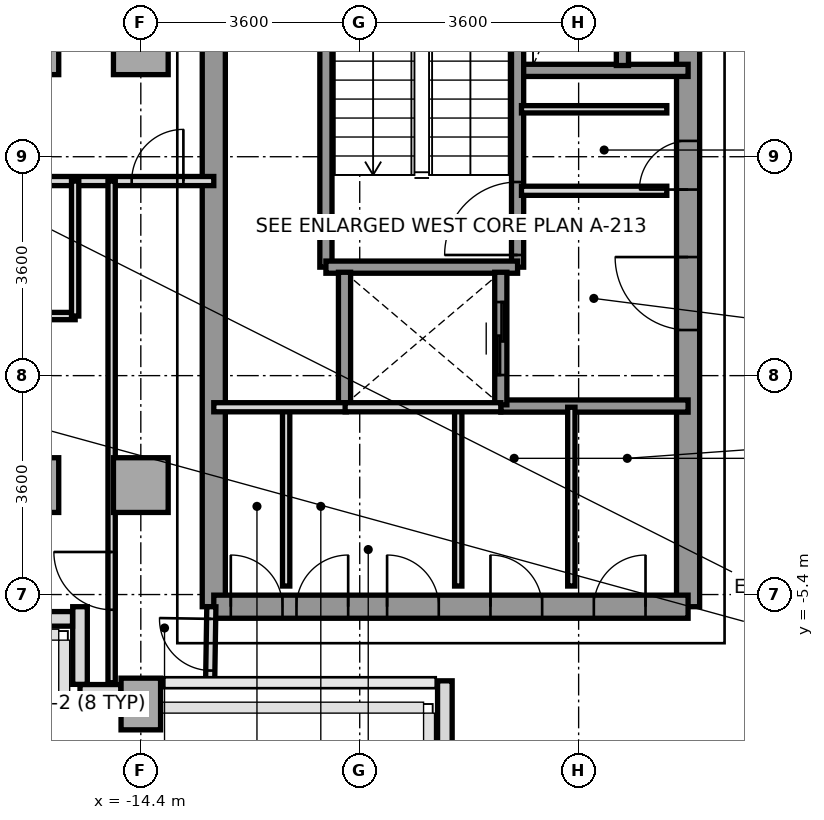
"""IFC4 building model, lengths in metres.
Left out: names, types, materials, properties, quantities, classifications, styles, units other than length and angle.
Written with IfcOpenShell. Run it as: python <this file> out.ifc"""

import sys

from ifc_helpers import new_model, si_unit, direction, frame, frame_2d, origin, origin_2d, place, context, subcontext, project, spatial, rectangle, extrude, source, transform, mapped, element, fill, save


model = new_model("IFC4")
c1 = context("Model", 3, precision=1e-05, world=origin(), true_north=direction((0.0, 1.0)))
c2 = subcontext(c1, "Body", "Model", "MODEL_VIEW")
j1 = project(units=[si_unit("LENGTHUNIT", "METRE"), si_unit("PLANEANGLEUNIT", "RADIAN")], contexts=[c1])
p1 = place(None, origin())
s1 = spatial("IfcSite", under=j1, at=p1, CompositionType="ELEMENT")
p2 = place(p1, origin())
s2 = spatial("IfcBuilding", under=s1, at=p2, CompositionType="ELEMENT")
p3 = place(p2, frame((0.0, 0.0, 184.2)))
s3 = spatial("IfcBuildingStorey", under=s2, at=p3, CompositionType="ELEMENT", Elevation=184.2)
m1 = source(origin(), c2, "Body", "SweptSolid", [
    extrude(rectangle(XDim=0.9, YDim=0.9, at=origin_2d()), origin(), (0.0, 0.0, 1.0), 3.2),
])
for number, where, z_axis, x_axis in (
    (1, (-16.2, -3.6, 0.0), (0.0, 0.0, 1.0), (1.0, 0.0, 0.0)),
    (2, (-16.2, 3.6, 0.0), (0.0, 0.0, 1.0), (1.0, 0.0, 0.0)),
):
    element("IfcColumn", number, at=place(p3, frame(where, z_axis=z_axis, x_axis=x_axis)), inside=s3, PredefinedType="COLUMN", context=c2, shape_type="MappedRepresentation", body=[
        mapped(m1, transform((0.0, 0.0, 0.0), x_axis=(1.0, 0.0, 0.0), y_axis=(0.0, 1.0, 0.0), z_axis=(0.0, 0.0, 1.0), scale=1.0)),
    ])
m2 = source(origin(), c2, "Body", "SweptSolid", [
    extrude(rectangle(XDim=0.65, YDim=0.85, at=origin_2d()), origin(), (0.0, 0.0, 1.0), 3.2),
])
p4 = place(p3, frame((-14.4, -7.2, 0.0), z_axis=(0.0, 0.0, 1.0), x_axis=(1.0, 0.0, 0.0)))
e3 = element("IfcColumn", 3, at=p4, inside=s3, PredefinedType="COLUMN", context=c2, shape_type="MappedRepresentation", body=[
    mapped(m2, transform((0.0, 0.0, 0.0), x_axis=(1.0, 0.0, 0.0), y_axis=(0.0, 1.0, 0.0), z_axis=(0.0, 0.0, 1.0), scale=1.0)),
])
for number, where, z_axis, x_axis in (
    (4, (-14.4, -3.6, 0.0), (0.0, 0.0, 1.0), (1.0, 0.0, 0.0)),
    (5, (-14.4, 3.6, 0.0), (0.0, 0.0, 1.0), (1.0, 0.0, 0.0)),
):
    element("IfcColumn", number, at=place(p3, frame(where, z_axis=z_axis, x_axis=x_axis)), inside=s3, PredefinedType="COLUMN", context=c2, shape_type="MappedRepresentation", body=[
        mapped(m1, transform((0.0, 0.0, 0.0), x_axis=(1.0, 0.0, 0.0), y_axis=(0.0, 1.0, 0.0), z_axis=(0.0, 0.0, 1.0), scale=1.0)),
    ])
p5 = place(p3, frame((-9.4, -8.547, 0.0), z_axis=(0.0, 0.0, 1.0), x_axis=(0.0, 1.0, 0.0)))
e6 = element("IfcWall", 6, at=p5, inside=s3, PredefinedType="PARAPET", context=c2, shape_type="SweptSolid", body=[
    extrude(rectangle(XDim=1.728, YDim=0.24, at=frame_2d((0.864, 0.0))), origin(), (0.0, 0.0, 1.0), 1.15),
])
p6 = place(p3, frame((-14.728, -7.0, 0.0), z_axis=(0.0, 0.0, 1.0), x_axis=(-1.0, 0.0, 0.0)))
e7 = element("IfcWall", 7, at=p6, inside=s3, PredefinedType="PARAPET", context=c2, shape_type="SweptSolid", body=[
    extrude(rectangle(XDim=0.672, YDim=0.24, at=frame_2d((0.336, 0.0))), origin(), (0.0, 0.0, 1.0), 1.15),
])
p7 = place(p3, frame((-15.4, -6.877, 0.0), z_axis=(0.0, 0.0, 1.0), x_axis=(0.0, 1.0, 0.0)))
e8 = element("IfcWall", 8, at=p7, inside=s3, PredefinedType="PARAPET", context=c2, shape_type="SweptSolid", body=[
    extrude(rectangle(XDim=1.277, YDim=0.24, at=frame_2d((0.638, 0.0))), origin(), (0.0, 0.0, 1.0), 1.15),
])
p8 = place(p3, frame((-15.523, -5.8, 0.0), z_axis=(0.0, 0.0, 1.0), x_axis=(-1.0, 0.0, 0.0)))
e9 = element("IfcWall", 9, at=p8, inside=s3, PredefinedType="PARAPET", context=c2, shape_type="SweptSolid", body=[
    extrude(rectangle(XDim=0.614, YDim=0.24, at=frame_2d((0.307, 0.0))), origin(), (0.0, 0.0, 1.0), 1.15),
])
p9 = place(p3, frame((-13.2, -5.6, 0.0), z_axis=(0.0, 0.0, 1.0), x_axis=(0.0, 1.0, 0.0)))
e10 = element("IfcWall", 10, at=p9, inside=s3, PredefinedType="SHEAR", context=c2, shape_type="SweptSolid", body=[
    extrude(rectangle(XDim=11.2, YDim=0.38, at=frame_2d((5.6, 0.0))), origin(), (0.0, 0.0, 1.0), 3.2),
])
p10 = place(p3, frame((-5.4, -5.6, 0.0), z_axis=(0.0, 0.0, 1.0), x_axis=(0.0, 1.0, 0.0)))
e11 = element("IfcWall", 11, at=p10, inside=s3, PredefinedType="SHEAR", context=c2, shape_type="SweptSolid", body=[
    extrude(rectangle(XDim=12.5, YDim=0.38, at=frame_2d((6.25, 0.0))), origin(), (0.0, 0.0, 1.0), 3.2),
])
p11 = place(p10, frame((4.55, 0.0, 0.0)))
e12 = element("IfcOpeningElement", 12, at=p11, cuts=e11, PredefinedType="OPENING", context=c2, shape_type="SweptSolid", body=[
    extrude(rectangle(XDim=1.2, YDim=2.2, at=frame_2d((0.6, 1.1))), frame((0.0, 0.2, 0.0), z_axis=(0.0, -1.0, 0.0), x_axis=(1.0, 0.0, 0.0)), (0.0, 0.0, 1.0), 0.4),
])
p12 = place(p10, frame((10.45, 0.0, 0.0)))
e13 = element("IfcOpeningElement", 13, at=p12, cuts=e11, PredefinedType="OPENING", context=c2, shape_type="SweptSolid", body=[
    extrude(rectangle(XDim=1.2, YDim=2.2, at=frame_2d((0.6, 1.1))), frame((0.0, 0.2, 0.0), z_axis=(0.0, -1.0, 0.0), x_axis=(1.0, 0.0, 0.0)), (0.0, 0.0, 1.0), 0.4),
])
p13 = place(p10, frame((6.86, 0.0, 0.0)))
e14 = element("IfcOpeningElement", 14, at=p13, cuts=e11, PredefinedType="OPENING", context=c2, shape_type="SweptSolid", body=[
    extrude(rectangle(XDim=0.8, YDim=2.1, at=frame_2d((0.4, 1.05))), frame((0.0, 0.2, 0.0), z_axis=(0.0, -1.0, 0.0), x_axis=(1.0, 0.0, 0.0)), (0.0, 0.0, 1.0), 0.4),
])
p14 = place(p3, frame((-13.2, -5.6, 0.0), z_axis=(0.0, 0.0, 1.0), x_axis=(1.0, 0.0, 0.0)))
e15 = element("IfcWall", 15, at=p14, inside=s3, PredefinedType="SHEAR", context=c2, shape_type="SweptSolid", body=[
    extrude(rectangle(XDim=7.8, YDim=0.38, at=frame_2d((3.9, 0.0))), origin(), (0.0, 0.0, 1.0), 3.2),
])
p15 = place(p14, frame((0.28, 0.0, 0.0)))
e16 = element("IfcOpeningElement", 16, at=p15, cuts=e15, PredefinedType="OPENING", context=c2, shape_type="SweptSolid", body=[
    extrude(rectangle(XDim=0.85, YDim=2.1, at=frame_2d((0.425, 1.05))), frame((0.0, 0.2, 0.0), z_axis=(0.0, -1.0, 0.0), x_axis=(1.0, 0.0, 0.0)), (0.0, 0.0, 1.0), 0.4),
])
p16 = place(p14, frame((1.36, 0.0, 0.0)))
e17 = element("IfcOpeningElement", 17, at=p16, cuts=e15, PredefinedType="OPENING", context=c2, shape_type="SweptSolid", body=[
    extrude(rectangle(XDim=0.85, YDim=2.1, at=frame_2d((0.425, 1.05))), frame((0.0, 0.2, 0.0), z_axis=(0.0, -1.0, 0.0), x_axis=(1.0, 0.0, 0.0)), (0.0, 0.0, 1.0), 0.4),
])
p17 = place(p14, frame((2.85, 0.0, 0.0)))
e18 = element("IfcOpeningElement", 18, at=p17, cuts=e15, PredefinedType="OPENING", context=c2, shape_type="SweptSolid", body=[
    extrude(rectangle(XDim=0.85, YDim=2.1, at=frame_2d((0.425, 1.05))), frame((0.0, 0.2, 0.0), z_axis=(0.0, -1.0, 0.0), x_axis=(1.0, 0.0, 0.0)), (0.0, 0.0, 1.0), 0.4),
])
p18 = place(p14, frame((4.55, 0.0, 0.0)))
e19 = element("IfcOpeningElement", 19, at=p18, cuts=e15, PredefinedType="OPENING", context=c2, shape_type="SweptSolid", body=[
    extrude(rectangle(XDim=0.85, YDim=2.1, at=frame_2d((0.425, 1.05))), frame((0.0, 0.2, 0.0), z_axis=(0.0, -1.0, 0.0), x_axis=(1.0, 0.0, 0.0)), (0.0, 0.0, 1.0), 0.4),
])
p19 = place(p14, frame((6.25, 0.0, 0.0)))
e20 = element("IfcOpeningElement", 20, at=p19, cuts=e15, PredefinedType="OPENING", context=c2, shape_type="SweptSolid", body=[
    extrude(rectangle(XDim=0.85, YDim=2.1, at=frame_2d((0.425, 1.05))), frame((0.0, 0.2, 0.0), z_axis=(0.0, -1.0, 0.0), x_axis=(1.0, 0.0, 0.0)), (0.0, 0.0, 1.0), 0.4),
])
p20 = place(p3, frame((-8.18, 3.22, 0.0), z_axis=(0.0, 0.0, 1.0), x_axis=(1.0, 0.0, 0.0)))
e21 = element("IfcWall", 21, at=p20, inside=s3, PredefinedType="SOLIDWALL", context=c2, shape_type="SweptSolid", body=[
    extrude(rectangle(XDim=2.78, YDim=0.2, at=frame_2d((1.39, 0.0))), origin(), (0.0, 0.0, 1.0), 3.2),
])
p21 = place(p3, frame((-8.48, -2.3, 0.0), z_axis=(0.0, 0.0, 1.0), x_axis=(1.0, 0.0, 0.0)))
e22 = element("IfcWall", 22, at=p21, inside=s3, PredefinedType="SOLIDWALL", context=c2, shape_type="SweptSolid", body=[
    extrude(rectangle(XDim=3.08, YDim=0.2, at=frame_2d((1.54, 0.0))), origin(), (0.0, 0.0, 1.0), 3.2),
])
p22 = place(p3, frame((-8.204, -0.016, 0.0), z_axis=(0.0, 0.0, 1.0), x_axis=(0.0, 1.0, 0.0)))
e23 = element("IfcWall", 23, at=p22, inside=s3, PredefinedType="SOLIDWALL", context=c2, shape_type="SweptSolid", body=[
    extrude(rectangle(XDim=6.916, YDim=0.2, at=frame_2d((3.458, 0.0))), origin(), (0.0, 0.0, 1.0), 3.2),
])
p23 = place(p22, frame((0.2, 0.0, 0.0)))
e24 = element("IfcOpeningElement", 24, at=p23, cuts=e23, PredefinedType="OPENING", context=c2, shape_type="SweptSolid", body=[
    extrude(rectangle(XDim=1.2, YDim=2.2, at=frame_2d((0.6, 1.1))), frame((0.0, 0.11, 0.0), z_axis=(0.0, -1.0, 0.0), x_axis=(1.0, 0.0, 0.0)), (0.0, 0.0, 1.0), 0.22),
])
p24 = place(p3, frame((-11.356, -0.016, 0.0), z_axis=(0.0, 0.0, 1.0), x_axis=(0.0, 1.0, 0.0)))
e25 = element("IfcWall", 25, at=p24, inside=s3, PredefinedType="SOLIDWALL", context=c2, shape_type="SweptSolid", body=[
    extrude(rectangle(XDim=6.916, YDim=0.2, at=frame_2d((3.458, 0.0))), origin(), (0.0, 0.0, 1.0), 3.2),
])
p25 = place(p3, frame((-11.356, -0.016, 0.0), z_axis=(0.0, 0.0, 1.0), x_axis=(1.0, 0.0, 0.0)))
e26 = element("IfcWall", 26, at=p25, inside=s3, PredefinedType="SOLIDWALL", context=c2, shape_type="SweptSolid", body=[
    extrude(rectangle(XDim=3.152, YDim=0.2, at=frame_2d((1.576, 0.0))), origin(), (0.0, 0.0, 1.0), 3.2),
])
p26 = place(p3, frame((-11.05, -2.28, 0.0), z_axis=(0.0, 0.0, 1.0), x_axis=(0.0, 1.0, 0.0)))
e27 = element("IfcWall", 27, at=p26, inside=s3, PredefinedType="SOLIDWALL", context=c2, shape_type="SweptSolid", body=[
    extrude(rectangle(XDim=2.18, YDim=0.2, at=frame_2d((1.09, 0.0))), origin(), (0.0, 0.0, 1.0), 3.2),
])
p27 = place(p3, frame((-8.48, -2.28, 0.0), z_axis=(0.0, 0.0, 1.0), x_axis=(0.0, 1.0, 0.0)))
e28 = element("IfcWall", 28, at=p27, inside=s3, PredefinedType="SOLIDWALL", context=c2, shape_type="SweptSolid", body=[
    extrude(rectangle(XDim=2.18, YDim=0.2, at=frame_2d((1.09, 0.0))), origin(), (0.0, 0.0, 1.0), 3.2),
])
p28 = place(p27, frame((0.49, 0.0, 0.0)))
e29 = element("IfcOpeningElement", 29, at=p28, cuts=e28, PredefinedType="OPENING", context=c2, shape_type="SweptSolid", body=[
    extrude(rectangle(XDim=1.2, YDim=2.2, at=frame_2d((0.6, 1.1))), frame((0.0, 0.11, 0.0), z_axis=(0.0, -1.0, 0.0), x_axis=(1.0, 0.0, 0.0)), (0.0, 0.0, 1.0), 0.22),
])
p29 = place(p3, frame((-6.48, 3.3, 0.0), z_axis=(0.0, 0.0, 1.0), x_axis=(0.0, 1.0, 0.0)))
e30 = element("IfcWall", 30, at=p29, inside=s3, PredefinedType="SOLIDWALL", context=c2, shape_type="SweptSolid", body=[
    extrude(rectangle(XDim=1.68, YDim=0.2, at=frame_2d((0.84, 0.0))), origin(), (0.0, 0.0, 1.0), 3.2),
])
p30 = place(p29, frame((0.29, 0.0, 0.0)))
e31 = element("IfcOpeningElement", 31, at=p30, cuts=e30, PredefinedType="OPENING", context=c2, shape_type="SweptSolid", body=[
    extrude(rectangle(XDim=1.1, YDim=2.2, at=frame_2d((0.55, 1.1))), frame((0.0, 0.11, 0.0), z_axis=(0.0, -1.0, 0.0), x_axis=(1.0, 0.0, 0.0)), (0.0, 0.0, 1.0), 0.22),
])
p31 = place(p3, frame((-8.14, 1.24, 0.0), z_axis=(0.0, 0.0, 1.0), x_axis=(1.0, 0.0, 0.0)))
e32 = element("IfcWall", 32, at=p31, inside=s3, PredefinedType="PARTITIONING", context=c2, shape_type="SweptSolid", body=[
    extrude(rectangle(XDim=2.39, YDim=0.15, at=frame_2d((1.195, 0.0))), origin(), (0.0, 0.0, 1.0), 2.3),
])
p32 = place(p3, frame((-8.14, 2.58, 0.0), z_axis=(0.0, 0.0, 1.0), x_axis=(1.0, 0.0, 0.0)))
e33 = element("IfcWall", 33, at=p32, inside=s3, PredefinedType="PARTITIONING", context=c2, shape_type="SweptSolid", body=[
    extrude(rectangle(XDim=2.39, YDim=0.12, at=frame_2d((1.195, 0.0))), origin(), (0.0, 0.0, 1.0), 2.3),
])
p33 = place(p3, frame((-12.01, -5.26, 0.0), z_axis=(0.0, 0.0, 1.0), x_axis=(0.0, 1.0, 0.0)))
e34 = element("IfcWall", 34, at=p33, inside=s3, PredefinedType="PARTITIONING", context=c2, shape_type="SweptSolid", body=[
    extrude(rectangle(XDim=2.94, YDim=0.12, at=frame_2d((1.47, 0.0))), origin(), (0.0, 0.0, 1.0), 3.2),
])
p34 = place(p3, frame((-13.2, -2.32, 0.0), z_axis=(0.0, 0.0, 1.0), x_axis=(1.0, 0.0, 0.0)))
e35 = element("IfcWall", 35, at=p34, inside=s3, PredefinedType="PARTITIONING", context=c2, shape_type="SweptSolid", body=[
    extrude(rectangle(XDim=2.18, YDim=0.15, at=frame_2d((1.09, 0.0))), origin(), (0.0, 0.0, 1.0), 3.2),
])
for number, where, z_axis, x_axis in (
    (36, (-9.18, -5.26, 0.0), (0.0, 0.0, 1.0), (0.0, 1.0, 0.0)),
    (37, (-7.32, -5.26, 0.0), (0.0, 0.0, 1.0), (0.0, 1.0, 0.0)),
):
    element("IfcWall", number, at=place(p3, frame(where, z_axis=z_axis, x_axis=x_axis)), inside=s3, PredefinedType="PARTITIONING", context=c2, shape_type="SweptSolid", body=[
        extrude(rectangle(XDim=2.94, YDim=0.12, at=frame_2d((1.47, 0.0))), origin(), (0.0, 0.0, 1.0), 3.2),
    ])
p35 = place(p3, frame((-11.04, -2.32, 0.0), z_axis=(0.0, 0.0, 1.0), x_axis=(1.0, 0.0, 0.0)))
e38 = element("IfcWall", 38, at=p35, inside=s3, PredefinedType="PARTITIONING", context=c2, shape_type="SweptSolid", body=[
    extrude(rectangle(XDim=2.56, YDim=0.15, at=frame_2d((1.28, 0.0))), origin(), (0.0, 0.0, 1.0), 3.2),
])
p36 = place(p3, frame((-13.26, -6.85, 0.0), z_axis=(0.0, 0.0, 1.0), x_axis=(0.016013571389, 0.999871774545, 0.0)))
e39 = element("IfcWall", 39, at=p36, inside=s3, PredefinedType="PARTITIONING", context=c2, shape_type="SweptSolid", body=[
    extrude(rectangle(XDim=1.25, YDim=0.15, at=frame_2d((0.625, 0.0))), origin(), (0.0, 0.0, 1.0), 3.2),
])
p37 = place(p36, frame((0.2, 0.0, 0.0)))
e40 = element("IfcOpeningElement", 40, at=p37, cuts=e39, PredefinedType="OPENING", context=c2, shape_type="SweptSolid", body=[
    extrude(rectangle(XDim=0.85, YDim=2.1, at=frame_2d((0.425, 1.05))), frame((0.0, 0.085, 0.0), z_axis=(0.0, -1.0, 0.0), x_axis=(1.0, 0.0, 0.0)), (0.0, 0.0, 1.0), 0.17),
])
p38 = place(p3, frame((-17.65, 1.4, 0.0), z_axis=(0.0, 0.0, 1.0), x_axis=(1.0, 0.0, 0.0)))
e41 = element("IfcWall", 41, at=p38, inside=s3, PredefinedType="PARTITIONING", context=c2, shape_type="SweptSolid", body=[
    extrude(rectangle(XDim=4.45, YDim=0.15, at=frame_2d((2.225, 0.0))), origin(), (0.0, 0.0, 1.0), 2.8),
])
p39 = place(p38, frame((3.1, 0.0, 0.0)))
e42 = element("IfcOpeningElement", 42, at=p39, cuts=e41, PredefinedType="OPENING", context=c2, shape_type="SweptSolid", body=[
    extrude(rectangle(XDim=0.85, YDim=2.1, at=frame_2d((0.425, 1.05))), frame((0.0, 0.085, 0.0), z_axis=(0.0, -1.0, 0.0), x_axis=(1.0, 0.0, 0.0)), (0.0, 0.0, 1.0), 0.17),
])
p40 = place(p3, frame((-14.88, -6.85, 0.0), z_axis=(0.0, 0.0, 1.0), x_axis=(0.0, 1.0, 0.0)))
e43 = element("IfcWall", 43, at=p40, inside=s3, PredefinedType="PARTITIONING", context=c2, shape_type="SweptSolid", body=[
    extrude(rectangle(XDim=8.25, YDim=0.12, at=frame_2d((4.125, 0.0))), origin(), (0.0, 0.0, 1.0), 3.2),
])
p41 = place(p40, frame((1.2, 0.0, 0.0)))
e44 = element("IfcOpeningElement", 44, at=p41, cuts=e43, PredefinedType="OPENING", context=c2, shape_type="SweptSolid", body=[
    extrude(rectangle(XDim=0.95, YDim=2.15, at=frame_2d((0.475, 1.075))), frame((0.0, 0.07, 0.0), z_axis=(0.0, -1.0, 0.0), x_axis=(1.0, 0.0, 0.0)), (0.0, 0.0, 1.0), 0.14),
])
p42 = place(p3, frame((-17.65, -0.82, 0.0), z_axis=(0.0, 0.0, 1.0), x_axis=(1.0, 0.0, 0.0)))
e45 = element("IfcWall", 45, at=p42, inside=s3, PredefinedType="PARTITIONING", context=c2, shape_type="SweptSolid", body=[
    extrude(rectangle(XDim=2.17, YDim=0.12, at=frame_2d((1.085, 0.0))), origin(), (0.0, 0.0, 1.0), 2.8),
])
p43 = place(p42, frame((0.3, 0.0, 0.0)))
e46 = element("IfcOpeningElement", 46, at=p43, cuts=e45, PredefinedType="OPENING", context=c2, shape_type="SweptSolid", body=[
    extrude(rectangle(XDim=0.85, YDim=2.1, at=frame_2d((0.425, 1.05))), frame((0.0, 0.07, 0.0), z_axis=(0.0, -1.0, 0.0), x_axis=(1.0, 0.0, 0.0)), (0.0, 0.0, 1.0), 0.14),
])
p44 = place(p3, frame((-15.48, -0.82, 0.0), z_axis=(0.0, 0.0, 1.0), x_axis=(0.0, 1.0, 0.0)))
e47 = element("IfcWall", 47, at=p44, inside=s3, PredefinedType="PARTITIONING", context=c2, shape_type="SweptSolid", body=[
    extrude(rectangle(XDim=2.22, YDim=0.12, at=frame_2d((1.11, 0.0))), origin(), (0.0, 0.0, 1.0), 3.2),
])
m3 = source(origin(), c2, "Body", "SweptSolid", [
    extrude(rectangle(XDim=1.2, YDim=2.2, at=frame_2d((0.6, 1.1))), frame((0.0, 0.025, 0.0), z_axis=(0.0, -1.0, 0.0), x_axis=(1.0, 0.0, 0.0)), (0.0, 0.0, 1.0), 0.05),
])
p45 = place(p23, origin())
e48 = element("IfcDoor", 48, at=p45, inside=s3, OperationType="SINGLE_SWING_LEFT", PredefinedType="DOOR", context=c2, shape_type="MappedRepresentation", body=[
    mapped(m3, transform((0.0, 0.0, 0.0), x_axis=(1.0, 0.0, 0.0), y_axis=(0.0, 1.0, 0.0), z_axis=(0.0, 0.0, 1.0), scale=1.0)),
])
fill(e24, e48)
p46 = place(p11, origin())
e49 = element("IfcDoor", 49, at=p46, inside=s3, OperationType="SINGLE_SWING_RIGHT", PredefinedType="DOOR", context=c2, shape_type="MappedRepresentation", body=[
    mapped(m3, transform((0.0, 0.0, 0.0), x_axis=(1.0, 0.0, 0.0), y_axis=(0.0, 1.0, 0.0), z_axis=(0.0, 0.0, 1.0), scale=1.0)),
])
fill(e12, e49)
m4 = source(origin(), c2, "Body", "SweptSolid", [
    extrude(rectangle(XDim=0.8, YDim=2.1, at=frame_2d((0.4, 1.05))), frame((0.0, 0.025, 0.0), z_axis=(0.0, -1.0, 0.0), x_axis=(1.0, 0.0, 0.0)), (0.0, 0.0, 1.0), 0.05),
])
p47 = place(p13, origin())
e50 = element("IfcDoor", 50, at=p47, inside=s3, OperationType="SINGLE_SWING_LEFT", PredefinedType="DOOR", context=c2, shape_type="MappedRepresentation", body=[
    mapped(m4, transform((0.0, 0.0, 0.0), x_axis=(1.0, 0.0, 0.0), y_axis=(0.0, 1.0, 0.0), z_axis=(0.0, 0.0, 1.0), scale=1.0)),
])
fill(e14, e50)
m5 = source(origin(), c2, "Body", "SweptSolid", [
    extrude(rectangle(XDim=0.85, YDim=2.1, at=frame_2d((0.425, 1.05))), frame((0.0, 0.025, 0.0), z_axis=(0.0, -1.0, 0.0), x_axis=(1.0, 0.0, 0.0)), (0.0, 0.0, 1.0), 0.05),
])
p48 = place(p15, origin())
e51 = element("IfcDoor", 51, at=p48, inside=s3, OperationType="SINGLE_SWING_LEFT", PredefinedType="DOOR", context=c2, shape_type="MappedRepresentation", body=[
    mapped(m5, transform((0.0, 0.0, 0.0), x_axis=(1.0, 0.0, 0.0), y_axis=(0.0, 1.0, 0.0), z_axis=(0.0, 0.0, 1.0), scale=1.0)),
])
fill(e16, e51)
p49 = place(p16, origin())
e52 = element("IfcDoor", 52, at=p49, inside=s3, OperationType="SINGLE_SWING_RIGHT", PredefinedType="DOOR", context=c2, shape_type="MappedRepresentation", body=[
    mapped(m5, transform((0.0, 0.0, 0.0), x_axis=(1.0, 0.0, 0.0), y_axis=(0.0, 1.0, 0.0), z_axis=(0.0, 0.0, 1.0), scale=1.0)),
])
fill(e17, e52)
p50 = place(p17, origin())
e53 = element("IfcDoor", 53, at=p50, inside=s3, OperationType="SINGLE_SWING_LEFT", PredefinedType="DOOR", context=c2, shape_type="MappedRepresentation", body=[
    mapped(m5, transform((0.0, 0.0, 0.0), x_axis=(1.0, 0.0, 0.0), y_axis=(0.0, 1.0, 0.0), z_axis=(0.0, 0.0, 1.0), scale=1.0)),
])
fill(e18, e53)
p51 = place(p18, origin())
e54 = element("IfcDoor", 54, at=p51, inside=s3, OperationType="SINGLE_SWING_LEFT", PredefinedType="DOOR", context=c2, shape_type="MappedRepresentation", body=[
    mapped(m5, transform((0.0, 0.0, 0.0), x_axis=(1.0, 0.0, 0.0), y_axis=(0.0, 1.0, 0.0), z_axis=(0.0, 0.0, 1.0), scale=1.0)),
])
fill(e19, e54)
p52 = place(p19, origin())
e55 = element("IfcDoor", 55, at=p52, inside=s3, OperationType="SINGLE_SWING_RIGHT", PredefinedType="DOOR", context=c2, shape_type="MappedRepresentation", body=[
    mapped(m5, transform((0.0, 0.0, 0.0), x_axis=(1.0, 0.0, 0.0), y_axis=(0.0, 1.0, 0.0), z_axis=(0.0, 0.0, 1.0), scale=1.0)),
])
fill(e20, e55)
p53 = place(p28, origin())
e56 = element("IfcDoor", 56, at=p53, inside=s3, OperationType="SLIDING_TO_RIGHT", PredefinedType="DOOR", context=c2, shape_type="MappedRepresentation", body=[
    mapped(m3, transform((0.0, 0.0, 0.0), x_axis=(1.0, 0.0, 0.0), y_axis=(0.0, 1.0, 0.0), z_axis=(0.0, 0.0, 1.0), scale=1.0)),
])
fill(e29, e56)
p54 = place(p37, origin())
e57 = element("IfcDoor", 57, at=p54, inside=s3, OperationType="SINGLE_SWING_RIGHT", PredefinedType="DOOR", context=c2, shape_type="MappedRepresentation", body=[
    mapped(m5, transform((0.0, 0.0, 0.0), x_axis=(1.0, 0.0, 0.0), y_axis=(0.0, 1.0, 0.0), z_axis=(0.0, 0.0, 1.0), scale=1.0)),
])
fill(e40, e57)
m6 = source(origin(), c2, "Body", "SweptSolid", [
    extrude(rectangle(XDim=0.95, YDim=2.15, at=frame_2d((0.475, 1.075))), frame((0.0, 0.025, 0.0), z_axis=(0.0, -1.0, 0.0), x_axis=(1.0, 0.0, 0.0)), (0.0, 0.0, 1.0), 0.05),
])
p55 = place(p41, origin())
e58 = element("IfcDoor", 58, at=p55, inside=s3, OperationType="SINGLE_SWING_RIGHT", PredefinedType="DOOR", context=c2, shape_type="MappedRepresentation", body=[
    mapped(m6, transform((0.0, 0.0, 0.0), x_axis=(1.0, 0.0, 0.0), y_axis=(0.0, 1.0, 0.0), z_axis=(0.0, 0.0, 1.0), scale=1.0)),
])
fill(e44, e58)
p56 = place(p39, origin())
e59 = element("IfcDoor", 59, at=p56, inside=s3, OperationType="SINGLE_SWING_RIGHT", PredefinedType="DOOR", context=c2, shape_type="MappedRepresentation", body=[
    mapped(m5, transform((0.0, 0.0, 0.0), x_axis=(1.0, 0.0, 0.0), y_axis=(0.0, 1.0, 0.0), z_axis=(0.0, 0.0, 1.0), scale=1.0)),
])
fill(e42, e59)
save(model, sys.argv[1])
